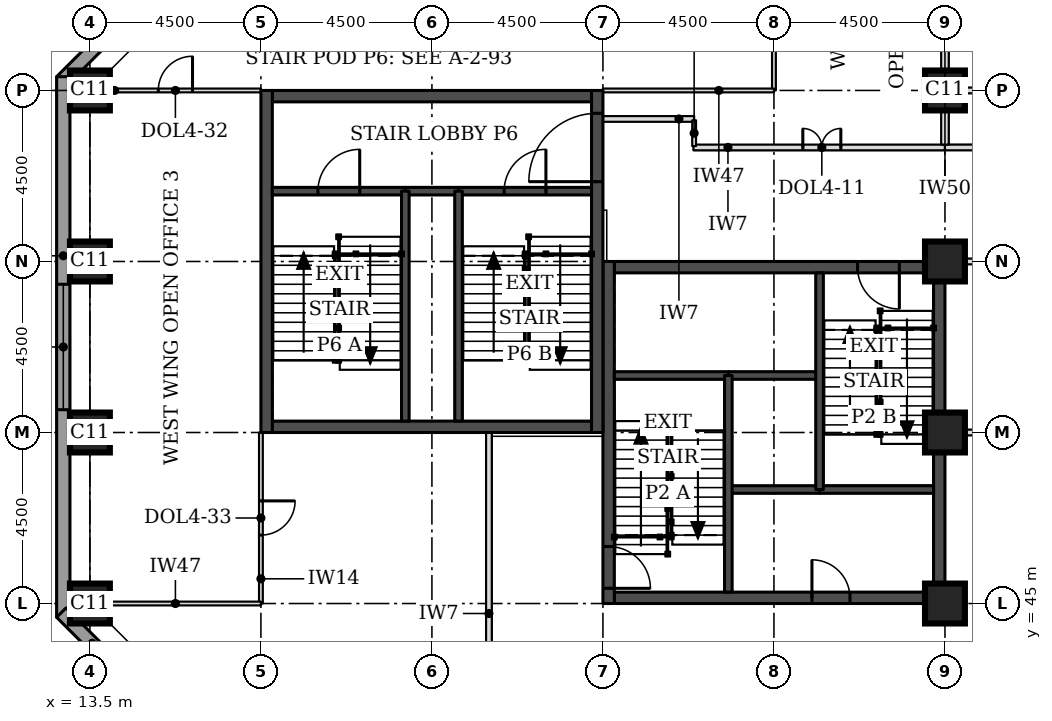
"""IFC4 building model, lengths in metres.
Left out: names, types, materials, properties, quantities, classifications, styles, units other than length and angle.
Written with IfcOpenShell. Run it as: python <this file> out.ifc"""

import sys

from ifc_helpers import new_model, si_unit, direction, frame, frame_2d, origin, origin_2d, place, context, subcontext, project, spatial, rectangle, extrude, element, fill, save


model = new_model("IFC4")
c1 = context("Model", 3, precision=1e-05, world=origin(), true_north=direction((0.0, 1.0)))
c2 = subcontext(c1, "Body", "Model", "MODEL_VIEW")
j1 = project(units=[si_unit("LENGTHUNIT", "METRE"), si_unit("PLANEANGLEUNIT", "RADIAN")], contexts=[c1])
p1 = place(None, origin())
s1 = spatial("IfcSite", under=j1, at=p1, CompositionType="ELEMENT")
p2 = place(p1, origin())
s2 = spatial("IfcBuilding", under=s1, at=p2, CompositionType="ELEMENT")
p3 = place(p2, frame((0.0, 0.0, 101.1)))
s3 = spatial("IfcBuildingStorey", under=s2, at=p3, CompositionType="ELEMENT", Elevation=101.1)
for number, where, z_axis, x_axis in (
    (1, (13.5, 45.0, 0.0), (0.0, 0.0, 1.0), (1.0, 0.0, 0.0)),
    (2, (36.0, 45.0, 0.0), (0.0, 0.0, 1.0), (1.0, 0.0, 0.0)),
    (3, (13.5, 49.5, 0.0), (0.0, 0.0, 1.0), (1.0, 0.0, 0.0)),
    (4, (36.0, 49.5, 0.0), (0.0, 0.0, 1.0), (1.0, 0.0, 0.0)),
    (5, (13.5, 54.0, 0.0), (0.0, 0.0, 1.0), (1.0, 0.0, 0.0)),
    (6, (36.0, 54.0, 0.0), (0.0, 0.0, 1.0), (1.0, 0.0, 0.0)),
    (7, (13.5, 58.5, 0.0), (0.0, 0.0, 1.0), (1.0, 0.0, 0.0)),
    (8, (36.0, 58.5, 0.0), (0.0, 0.0, 1.0), (1.0, 0.0, 0.0)),
):
    element("IfcColumn", number, at=place(p3, frame(where, z_axis=z_axis, x_axis=x_axis)), inside=s3, PredefinedType="COLUMN", context=c2, shape_type="SweptSolid", body=[
        extrude(rectangle(XDim=1.05, YDim=1.05, at=origin_2d()), origin(), (0.0, 0.0, 1.0), 3.7),
    ])
p4 = place(p3, frame((27.3, 45.15, 0.0), z_axis=(0.0, 0.0, 1.0), x_axis=(1.0, 0.0, 0.0)))
e9 = element("IfcWall", 9, at=p4, inside=s3, PredefinedType="SHEAR", context=c2, shape_type="SweptSolid", body=[
    extrude(rectangle(XDim=8.4, YDim=0.3, at=frame_2d((4.2, 0.0))), origin(), (0.0, 0.0, 1.0), 3.7),
])
p5 = place(p4, frame((5.2, 0.0, 0.0)))
e10 = element("IfcOpeningElement", 10, at=p5, cuts=e9, PredefinedType="OPENING", context=c2, shape_type="SweptSolid", body=[
    extrude(rectangle(XDim=1.0, YDim=2.1, at=frame_2d((0.5, 1.05))), frame((0.0, 0.16, 0.0), z_axis=(0.0, -1.0, 0.0), x_axis=(1.0, 0.0, 0.0)), (0.0, 0.0, 1.0), 0.32),
])
p6 = place(p3, frame((27.3, 53.85, 0.0), z_axis=(0.0, 0.0, 1.0), x_axis=(1.0, 0.0, 0.0)))
e11 = element("IfcWall", 11, at=p6, inside=s3, PredefinedType="SHEAR", context=c2, shape_type="SweptSolid", body=[
    extrude(rectangle(XDim=8.4, YDim=0.3, at=frame_2d((4.2, 0.0))), origin(), (0.0, 0.0, 1.0), 3.7),
])
p7 = place(p6, frame((6.4, 0.0, 0.0)))
e12 = element("IfcOpeningElement", 12, at=p7, cuts=e11, PredefinedType="OPENING", context=c2, shape_type="SweptSolid", body=[
    extrude(rectangle(XDim=1.1, YDim=2.1, at=frame_2d((0.55, 1.05))), frame((0.0, 0.16, 0.0), z_axis=(0.0, -1.0, 0.0), x_axis=(1.0, 0.0, 0.0)), (0.0, 0.0, 1.0), 0.32),
])
p8 = place(p3, frame((27.15, 45.0, 0.0), z_axis=(0.0, 0.0, 1.0), x_axis=(0.0, 1.0, 0.0)))
e13 = element("IfcWall", 13, at=p8, inside=s3, PredefinedType="SHEAR", context=c2, shape_type="SweptSolid", body=[
    extrude(rectangle(XDim=9.0, YDim=0.3, at=frame_2d((4.5, 0.0))), origin(), (0.0, 0.0, 1.0), 3.7),
])
p9 = place(p8, frame((0.4, 0.0, 0.0)))
e14 = element("IfcOpeningElement", 14, at=p9, cuts=e13, PredefinedType="OPENING", context=c2, shape_type="SweptSolid", body=[
    extrude(rectangle(XDim=1.1, YDim=2.1, at=frame_2d((0.55, 1.05))), frame((0.0, 0.16, 0.0), z_axis=(0.0, -1.0, 0.0), x_axis=(1.0, 0.0, 0.0)), (0.0, 0.0, 1.0), 0.32),
])
p10 = place(p3, frame((35.85, 45.0, 0.0), z_axis=(0.0, 0.0, 1.0), x_axis=(0.0, 1.0, 0.0)))
e15 = element("IfcWall", 15, at=p10, inside=s3, PredefinedType="SHEAR", context=c2, shape_type="SweptSolid", body=[
    extrude(rectangle(XDim=9.0, YDim=0.3, at=frame_2d((4.5, 0.0))), origin(), (0.0, 0.0, 1.0), 3.7),
])
for number, where, z_axis, x_axis in (
    (16, (18.3, 49.65, 0.0), (0.0, 0.0, 1.0), (1.0, 0.0, 0.0)),
    (17, (18.3, 58.35, 0.0), (0.0, 0.0, 1.0), (1.0, 0.0, 0.0)),
):
    element("IfcWall", number, at=place(p3, frame(where, z_axis=z_axis, x_axis=x_axis)), inside=s3, PredefinedType="SHEAR", context=c2, shape_type="SweptSolid", body=[
        extrude(rectangle(XDim=8.4, YDim=0.3, at=frame_2d((4.2, 0.0))), origin(), (0.0, 0.0, 1.0), 3.7),
    ])
p11 = place(p3, frame((18.15, 49.5, 0.0), z_axis=(0.0, 0.0, 1.0), x_axis=(0.0, 1.0, 0.0)))
e18 = element("IfcWall", 18, at=p11, inside=s3, PredefinedType="SHEAR", context=c2, shape_type="SweptSolid", body=[
    extrude(rectangle(XDim=9.0, YDim=0.3, at=frame_2d((4.5, 0.0))), origin(), (0.0, 0.0, 1.0), 3.7),
])
p12 = place(p3, frame((26.85, 49.5, 0.0), z_axis=(0.0, 0.0, 1.0), x_axis=(0.0, 1.0, 0.0)))
e19 = element("IfcWall", 19, at=p12, inside=s3, PredefinedType="SHEAR", context=c2, shape_type="SweptSolid", body=[
    extrude(rectangle(XDim=9.0, YDim=0.3, at=frame_2d((4.5, 0.0))), origin(), (0.0, 0.0, 1.0), 3.7),
])
p13 = place(p12, frame((6.6, 0.0, 0.0)))
e20 = element("IfcOpeningElement", 20, at=p13, cuts=e19, PredefinedType="OPENING", context=c2, shape_type="SweptSolid", body=[
    extrude(rectangle(XDim=1.8, YDim=2.1, at=frame_2d((0.9, 1.05))), frame((0.0, 0.16, 0.0), z_axis=(0.0, -1.0, 0.0), x_axis=(1.0, 0.0, 0.0)), (0.0, 0.0, 1.0), 0.32),
])
p14 = place(p3, frame((17.761, 63.751, 0.0), z_axis=(0.0, 0.0, 1.0), x_axis=(-0.707106781187, -0.707106781187, 0.0)))
e21 = element("IfcWall", 21, at=p14, inside=s3, PredefinedType="STANDARD", context=c2, shape_type="SweptSolid", body=[
    extrude(rectangle(XDim=7.089, YDim=0.35, at=frame_2d((3.544, 0.0))), origin(), (0.0, 0.0, 1.0), 3.525),
])
p15 = place(p14, frame((1.894, 0.0, 0.9)))
e22 = element("IfcOpeningElement", 22, at=p15, cuts=e21, PredefinedType="OPENING", context=c2, shape_type="SweptSolid", body=[
    extrude(rectangle(XDim=3.3, YDim=1.9, at=frame_2d((1.65, 0.95))), frame((0.0, 0.185, 0.0), z_axis=(0.0, -1.0, 0.0), x_axis=(1.0, 0.0, 0.0)), (0.0, 0.0, 1.0), 0.37),
])
p16 = place(p3, frame((12.8, 58.862, 0.0), z_axis=(0.0, 0.0, 1.0), x_axis=(0.0, -1.0, 0.0)))
e23 = element("IfcWall", 23, at=p16, inside=s3, PredefinedType="STANDARD", context=c2, shape_type="SweptSolid", body=[
    extrude(rectangle(XDim=14.225, YDim=0.35, at=frame_2d((7.112, 0.0))), origin(), (0.0, 0.0, 1.0), 3.525),
])
p17 = place(p16, frame((5.462, 0.0, 0.9)))
e24 = element("IfcOpeningElement", 24, at=p17, cuts=e23, PredefinedType="OPENING", context=c2, shape_type="SweptSolid", body=[
    extrude(rectangle(XDim=3.3, YDim=1.9, at=frame_2d((1.65, 0.95))), frame((0.0, 0.185, 0.0), z_axis=(0.0, -1.0, 0.0), x_axis=(1.0, 0.0, 0.0)), (0.0, 0.0, 1.0), 0.37),
])
p18 = place(p3, frame((12.749, 44.761, 0.0), z_axis=(0.0, 0.0, 1.0), x_axis=(0.707106781187, -0.707106781187, 0.0)))
e25 = element("IfcWall", 25, at=p18, inside=s3, PredefinedType="STANDARD", context=c2, shape_type="SweptSolid", body=[
    extrude(rectangle(XDim=7.089, YDim=0.35, at=frame_2d((3.544, 0.0))), origin(), (0.0, 0.0, 1.0), 3.525),
])
p19 = place(p18, frame((1.894, 0.0, 0.9)))
e26 = element("IfcOpeningElement", 26, at=p19, cuts=e25, PredefinedType="OPENING", context=c2, shape_type="SweptSolid", body=[
    extrude(rectangle(XDim=3.3, YDim=1.9, at=frame_2d((1.65, 0.95))), frame((0.0, 0.185, 0.0), z_axis=(0.0, -1.0, 0.0), x_axis=(1.0, 0.0, 0.0)), (0.0, 0.0, 1.0), 0.37),
])
for number, where, z_axis, x_axis in (
    (27, (36.525, 49.5, 0.0), (0.0, 0.0, 1.0), (1.0, 0.0, 0.0)),
    (28, (36.525, 54.0, 0.0), (0.0, 0.0, 1.0), (1.0, 0.0, 0.0)),
):
    element("IfcWall", number, at=place(p3, frame(where, z_axis=z_axis, x_axis=x_axis)), inside=s3, PredefinedType="PARTITIONING", context=c2, shape_type="SweptSolid", body=[
        extrude(rectangle(XDim=5.55, YDim=0.15, at=frame_2d((2.775, 0.0))), origin(), (0.0, 0.0, 1.0), 3.55),
    ])
p20 = place(p3, frame((29.38, 57.0, 0.0), z_axis=(0.0, 0.0, 1.0), x_axis=(1.0, 0.0, 0.0)))
e29 = element("IfcWall", 29, at=p20, inside=s3, PredefinedType="PARTITIONING", context=c2, shape_type="SweptSolid", body=[
    extrude(rectangle(XDim=6.62, YDim=0.15, at=frame_2d((3.31, 0.0))), origin(), (0.0, 0.0, 1.0), 3.55),
])
p21 = place(p20, frame((2.88, 0.0, 0.0)))
e30 = element("IfcOpeningElement", 30, at=p21, cuts=e29, PredefinedType="OPENING", context=c2, shape_type="SweptSolid", body=[
    extrude(rectangle(XDim=1.0, YDim=2.1, at=frame_2d((0.5, 1.05))), frame((0.0, 0.085, 0.0), z_axis=(0.0, -1.0, 0.0), x_axis=(1.0, 0.0, 0.0)), (0.0, 0.0, 1.0), 0.17),
])
p22 = place(p3, frame((36.0, 57.0, 0.0), z_axis=(0.0, 0.0, 1.0), x_axis=(1.0, 0.0, 0.0)))
e31 = element("IfcWall", 31, at=p22, inside=s3, PredefinedType="PARTITIONING", context=c2, shape_type="SweptSolid", body=[
    extrude(rectangle(XDim=6.075, YDim=0.15, at=frame_2d((3.038, 0.0))), origin(), (0.0, 0.0, 1.0), 3.55),
])
p23 = place(p3, frame((36.525, 58.5, 0.0), z_axis=(0.0, 0.0, 1.0), x_axis=(1.0, 0.0, 0.0)))
e32 = element("IfcWall", 32, at=p23, inside=s3, PredefinedType="PARTITIONING", context=c2, shape_type="SweptSolid", body=[
    extrude(rectangle(XDim=2.55, YDim=0.15, at=frame_2d((1.275, 0.0))), origin(), (0.0, 0.0, 1.0), 3.55),
])
p24 = place(p3, frame((24.0, 39.975, 0.0), z_axis=(0.0, 0.0, 1.0), x_axis=(0.0, 1.0, 0.0)))
e33 = element("IfcWall", 33, at=p24, inside=s3, PredefinedType="PARTITIONING", context=c2, shape_type="SweptSolid", body=[
    extrude(rectangle(XDim=9.525, YDim=0.15, at=frame_2d((4.762, 0.0))), origin(), (0.0, 0.0, 1.0), 3.55),
])
p25 = place(p3, frame((36.0, 57.075, 0.0), z_axis=(0.0, 0.0, 1.0), x_axis=(0.0, 1.0, 0.0)))
e34 = element("IfcWall", 34, at=p25, inside=s3, PredefinedType="PARTITIONING", context=c2, shape_type="SweptSolid", body=[
    extrude(rectangle(XDim=0.9, YDim=0.2, at=frame_2d((0.45, 0.0))), origin(), (0.0, 0.0, 1.0), 2.8),
])
p26 = place(p3, frame((36.0, 58.995, 0.0), z_axis=(0.0, 0.0, 1.0), x_axis=(0.0, 1.0, 0.0)))
e35 = element("IfcWall", 35, at=p26, inside=s3, PredefinedType="PARTITIONING", context=c2, shape_type="SweptSolid", body=[
    extrude(rectangle(XDim=1.005, YDim=0.2, at=frame_2d((0.502, 0.0))), origin(), (0.0, 0.0, 1.0), 2.8),
])
p27 = place(p3, frame((31.5, 63.0, 0.0), z_axis=(0.0, 0.0, 1.0), x_axis=(0.0, -1.0, 0.0)))
e36 = element("IfcWall", 36, at=p27, inside=s3, PredefinedType="PARTITIONING", context=c2, shape_type="SweptSolid", body=[
    extrude(rectangle(XDim=4.5, YDim=0.1, at=frame_2d((2.25, 0.0))), origin(), (0.0, 0.0, 1.0), 3.55),
])
p28 = place(p27, frame((1.8, 0.0, 0.0)))
e37 = element("IfcOpeningElement", 37, at=p28, cuts=e36, PredefinedType="OPENING", context=c2, shape_type="SweptSolid", body=[
    extrude(rectangle(XDim=0.9, YDim=2.1, at=frame_2d((0.45, 1.05))), frame((0.0, 0.06, 0.0), z_axis=(0.0, -1.0, 0.0), x_axis=(1.0, 0.0, 0.0)), (0.0, 0.0, 1.0), 0.12),
])
p29 = place(p3, frame((31.5, 58.5, 0.0), z_axis=(0.0, 0.0, 1.0), x_axis=(-1.0, 0.0, 0.0)))
e38 = element("IfcWall", 38, at=p29, inside=s3, PredefinedType="PARTITIONING", context=c2, shape_type="SweptSolid", body=[
    extrude(rectangle(XDim=4.5, YDim=0.1, at=frame_2d((2.25, 0.0))), origin(), (0.0, 0.0, 1.0), 2.55),
])
p30 = place(p3, frame((13.5, 58.5, 0.0), z_axis=(0.0, 0.0, 1.0), x_axis=(1.0, 0.0, 0.0)))
e39 = element("IfcWall", 39, at=p30, inside=s3, PredefinedType="PARTITIONING", context=c2, shape_type="SweptSolid", body=[
    extrude(rectangle(XDim=4.5, YDim=0.1, at=frame_2d((2.25, 0.0))), origin(), (0.0, 0.0, 1.0), 2.55),
])
p31 = place(p30, frame((1.8, 0.0, 0.0)))
e40 = element("IfcOpeningElement", 40, at=p31, cuts=e39, PredefinedType="OPENING", context=c2, shape_type="SweptSolid", body=[
    extrude(rectangle(XDim=0.9, YDim=2.1, at=frame_2d((0.45, 1.05))), frame((0.0, 0.06, 0.0), z_axis=(0.0, -1.0, 0.0), x_axis=(1.0, 0.0, 0.0)), (0.0, 0.0, 1.0), 0.12),
])
p32 = place(p3, frame((18.0, 49.5, 0.0), z_axis=(0.0, 0.0, 1.0), x_axis=(0.0, -1.0, 0.0)))
e41 = element("IfcWall", 41, at=p32, inside=s3, PredefinedType="PARTITIONING", context=c2, shape_type="SweptSolid", body=[
    extrude(rectangle(XDim=4.5, YDim=0.1, at=frame_2d((2.25, 0.0))), origin(), (0.0, 0.0, 1.0), 3.55),
])
p33 = place(p32, frame((1.8, 0.0, 0.0)))
e42 = element("IfcOpeningElement", 42, at=p33, cuts=e41, PredefinedType="OPENING", context=c2, shape_type="SweptSolid", body=[
    extrude(rectangle(XDim=0.9, YDim=2.1, at=frame_2d((0.45, 1.05))), frame((0.0, 0.06, 0.0), z_axis=(0.0, -1.0, 0.0), x_axis=(1.0, 0.0, 0.0)), (0.0, 0.0, 1.0), 0.12),
])
p34 = place(p3, frame((18.0, 45.0, 0.0), z_axis=(0.0, 0.0, 1.0), x_axis=(-1.0, 0.0, 0.0)))
e43 = element("IfcWall", 43, at=p34, inside=s3, PredefinedType="PARTITIONING", context=c2, shape_type="SweptSolid", body=[
    extrude(rectangle(XDim=4.5, YDim=0.1, at=frame_2d((2.25, 0.0))), origin(), (0.0, 0.0, 1.0), 2.55),
])
p35 = place(p3, frame((27.0, 57.75, 0.0), z_axis=(0.0, 0.0, 1.0), x_axis=(1.0, 0.0, 0.0)))
e44 = element("IfcWall", 44, at=p35, inside=s3, PredefinedType="PARTITIONING", context=c2, shape_type="SweptSolid", body=[
    extrude(rectangle(XDim=2.4, YDim=0.15, at=frame_2d((1.2, 0.0))), origin(), (0.0, 0.0, 1.0), 3.55),
])
p36 = place(p3, frame((29.4, 57.715, 0.0), z_axis=(0.0, 0.0, 1.0), x_axis=(0.0, -1.0, 0.0)))
e45 = element("IfcWall", 45, at=p36, inside=s3, PredefinedType="PARTITIONING", context=c2, shape_type="SweptSolid", body=[
    extrude(rectangle(XDim=0.68, YDim=0.1, at=frame_2d((0.34, 0.0))), origin(), (0.0, 0.0, 1.0), 3.55),
])
p37 = place(p3, frame((30.3, 48.0, 0.0), z_axis=(0.0, 0.0, 1.0), x_axis=(1.0, 0.0, 0.0)))
e46 = element("IfcWall", 46, at=p37, inside=s3, PredefinedType="SOLIDWALL", context=c2, shape_type="SweptSolid", body=[
    extrude(rectangle(XDim=2.4, YDim=0.2, at=frame_2d((1.2, 0.0))), origin(), (0.0, 0.0, 1.0), 3.55),
])
p38 = place(p3, frame((32.7, 48.0, 0.0), z_axis=(0.0, 0.0, 1.0), x_axis=(1.0, 0.0, 0.0)))
e47 = element("IfcWall", 47, at=p38, inside=s3, PredefinedType="SOLIDWALL", context=c2, shape_type="SweptSolid", body=[
    extrude(rectangle(XDim=3.0, YDim=0.2, at=frame_2d((1.5, 0.0))), origin(), (0.0, 0.0, 1.0), 3.55),
])
p39 = place(p3, frame((30.3, 51.0, 0.0), z_axis=(0.0, 0.0, 1.0), x_axis=(1.0, 0.0, 0.0)))
e48 = element("IfcWall", 48, at=p39, inside=s3, PredefinedType="SOLIDWALL", context=c2, shape_type="SweptSolid", body=[
    extrude(rectangle(XDim=2.4, YDim=0.2, at=frame_2d((1.2, 0.0))), origin(), (0.0, 0.0, 1.0), 3.7),
])
p40 = place(p3, frame((27.3, 51.0, 0.0), z_axis=(0.0, 0.0, 1.0), x_axis=(1.0, 0.0, 0.0)))
e49 = element("IfcWall", 49, at=p40, inside=s3, PredefinedType="SOLIDWALL", context=c2, shape_type="SweptSolid", body=[
    extrude(rectangle(XDim=3.0, YDim=0.2, at=frame_2d((1.5, 0.0))), origin(), (0.0, 0.0, 1.0), 3.55),
])
for number, where, z_axis, x_axis in (
    (50, (30.3, 45.3, 0.0), (0.0, 0.0, 1.0), (0.0, 1.0, 0.0)),
    (51, (32.7, 48.0, 0.0), (0.0, 0.0, 1.0), (0.0, 1.0, 0.0)),
):
    element("IfcWall", number, at=place(p3, frame(where, z_axis=z_axis, x_axis=x_axis)), inside=s3, PredefinedType="SOLIDWALL", context=c2, shape_type="SweptSolid", body=[
        extrude(rectangle(XDim=5.7, YDim=0.2, at=frame_2d((2.85, 0.0))), origin(), (0.0, 0.0, 1.0), 3.55),
    ])
p41 = place(p3, frame((21.8, 55.85, 0.0), z_axis=(0.0, 0.0, 1.0), x_axis=(1.0, 0.0, 0.0)))
e52 = element("IfcWall", 52, at=p41, inside=s3, PredefinedType="SOLIDWALL", context=c2, shape_type="SweptSolid", body=[
    extrude(rectangle(XDim=1.4, YDim=0.2, at=frame_2d((0.7, 0.0))), origin(), (0.0, 0.0, 1.0), 3.55),
])
p42 = place(p3, frame((18.3, 55.85, 0.0), z_axis=(0.0, 0.0, 1.0), x_axis=(1.0, 0.0, 0.0)))
e53 = element("IfcWall", 53, at=p42, inside=s3, PredefinedType="SOLIDWALL", context=c2, shape_type="SweptSolid", body=[
    extrude(rectangle(XDim=3.5, YDim=0.2, at=frame_2d((1.75, 0.0))), origin(), (0.0, 0.0, 1.0), 3.55),
])
p43 = place(p42, frame((1.2, 0.0, 0.0)))
e54 = element("IfcOpeningElement", 54, at=p43, cuts=e53, PredefinedType="OPENING", context=c2, shape_type="SweptSolid", body=[
    extrude(rectangle(XDim=1.1, YDim=2.1, at=frame_2d((0.55, 1.05))), frame((0.0, 0.11, 0.0), z_axis=(0.0, -1.0, 0.0), x_axis=(1.0, 0.0, 0.0)), (0.0, 0.0, 1.0), 0.22),
])
p44 = place(p3, frame((23.2, 55.85, 0.0), z_axis=(0.0, 0.0, 1.0), x_axis=(1.0, 0.0, 0.0)))
e55 = element("IfcWall", 55, at=p44, inside=s3, PredefinedType="SOLIDWALL", context=c2, shape_type="SweptSolid", body=[
    extrude(rectangle(XDim=3.5, YDim=0.2, at=frame_2d((1.75, 0.0))), origin(), (0.0, 0.0, 1.0), 3.55),
])
p45 = place(p44, frame((1.2, 0.0, 0.0)))
e56 = element("IfcOpeningElement", 56, at=p45, cuts=e55, PredefinedType="OPENING", context=c2, shape_type="SweptSolid", body=[
    extrude(rectangle(XDim=1.1, YDim=2.1, at=frame_2d((0.55, 1.05))), frame((0.0, 0.11, 0.0), z_axis=(0.0, -1.0, 0.0), x_axis=(1.0, 0.0, 0.0)), (0.0, 0.0, 1.0), 0.22),
])
for number, where, z_axis, x_axis in (
    (57, (21.8, 49.8, 0.0), (0.0, 0.0, 1.0), (0.0, 1.0, 0.0)),
    (58, (23.2, 49.8, 0.0), (0.0, 0.0, 1.0), (0.0, 1.0, 0.0)),
):
    element("IfcWall", number, at=place(p3, frame(where, z_axis=z_axis, x_axis=x_axis)), inside=s3, PredefinedType="SOLIDWALL", context=c2, shape_type="SweptSolid", body=[
        extrude(rectangle(XDim=6.05, YDim=0.2, at=frame_2d((3.025, 0.0))), origin(), (0.0, 0.0, 1.0), 3.55),
    ])
p46 = place(p17, origin())
e59 = element("IfcWindow", 59, at=p46, inside=s3, PartitioningType="SINGLE_PANEL", PredefinedType="WINDOW", context=c2, shape_type="SweptSolid", body=[
    extrude(rectangle(XDim=3.3, YDim=1.9, at=frame_2d((1.65, 0.95))), frame((0.0, 0.085, 0.0), z_axis=(0.0, -1.0, 0.0), x_axis=(1.0, 0.0, 0.0)), (0.0, 0.0, 1.0), 0.06),
])
fill(e24, e59)
p47 = place(p21, origin())
e60 = element("IfcDoor", 60, at=p47, inside=s3, OperationType="DOUBLE_DOOR_SINGLE_SWING", PredefinedType="DOOR", context=c2, shape_type="SweptSolid", body=[
    extrude(rectangle(XDim=1.0, YDim=2.1, at=frame_2d((0.5, 1.05))), frame((0.0, 0.025, 0.0), z_axis=(0.0, -1.0, 0.0), x_axis=(1.0, 0.0, 0.0)), (0.0, 0.0, 1.0), 0.05),
])
fill(e30, e60)
p48 = place(p31, origin())
e61 = element("IfcDoor", 61, at=p48, inside=s3, OperationType="SINGLE_SWING_RIGHT", PredefinedType="DOOR", context=c2, shape_type="SweptSolid", body=[
    extrude(rectangle(XDim=0.9, YDim=2.1, at=frame_2d((0.45, 1.05))), frame((0.0, 0.025, 0.0), z_axis=(0.0, -1.0, 0.0), x_axis=(1.0, 0.0, 0.0)), (0.0, 0.0, 1.0), 0.05),
])
fill(e40, e61)
p49 = place(p33, origin())
e62 = element("IfcDoor", 62, at=p49, inside=s3, OperationType="SINGLE_SWING_LEFT", PredefinedType="DOOR", context=c2, shape_type="SweptSolid", body=[
    extrude(rectangle(XDim=0.9, YDim=2.1, at=frame_2d((0.45, 1.05))), frame((0.0, 0.025, 0.0), z_axis=(0.0, -1.0, 0.0), x_axis=(1.0, 0.0, 0.0)), (0.0, 0.0, 1.0), 0.05),
])
fill(e42, e62)
p50 = place(p9, frame((1.1, 0.0, 0.0), z_axis=(0.0, 0.0, 1.0), x_axis=(-1.0, 0.0, 0.0)))
e63 = element("IfcDoor", 63, at=p50, inside=s3, OperationType="SINGLE_SWING_RIGHT", PredefinedType="DOOR", context=c2, shape_type="SweptSolid", body=[
    extrude(rectangle(XDim=1.1, YDim=2.1, at=frame_2d((0.55, 1.05))), frame((0.0, 0.025, 0.0), z_axis=(0.0, -1.0, 0.0), x_axis=(1.0, 0.0, 0.0)), (0.0, 0.0, 1.0), 0.05),
])
fill(e14, e63)
p51 = place(p7, frame((1.1, 0.0, 0.0), z_axis=(0.0, 0.0, 1.0), x_axis=(-1.0, 0.0, 0.0)))
e64 = element("IfcDoor", 64, at=p51, inside=s3, OperationType="SINGLE_SWING_LEFT", PredefinedType="DOOR", context=c2, shape_type="SweptSolid", body=[
    extrude(rectangle(XDim=1.1, YDim=2.1, at=frame_2d((0.55, 1.05))), frame((0.0, 0.025, 0.0), z_axis=(0.0, -1.0, 0.0), x_axis=(1.0, 0.0, 0.0)), (0.0, 0.0, 1.0), 0.05),
])
fill(e12, e64)
p52 = place(p5, origin())
e65 = element("IfcDoor", 65, at=p52, inside=s3, OperationType="SINGLE_SWING_LEFT", PredefinedType="DOOR", context=c2, shape_type="SweptSolid", body=[
    extrude(rectangle(XDim=1.0, YDim=2.1, at=frame_2d((0.5, 1.05))), frame((0.0, 0.025, 0.0), z_axis=(0.0, -1.0, 0.0), x_axis=(1.0, 0.0, 0.0)), (0.0, 0.0, 1.0), 0.05),
])
fill(e10, e65)
p53 = place(p43, origin())
e66 = element("IfcDoor", 66, at=p53, inside=s3, OperationType="SINGLE_SWING_RIGHT", PredefinedType="DOOR", context=c2, shape_type="SweptSolid", body=[
    extrude(rectangle(XDim=1.1, YDim=2.1, at=frame_2d((0.55, 1.05))), frame((0.0, 0.025, 0.0), z_axis=(0.0, -1.0, 0.0), x_axis=(1.0, 0.0, 0.0)), (0.0, 0.0, 1.0), 0.05),
])
fill(e54, e66)
p54 = place(p45, origin())
e67 = element("IfcDoor", 67, at=p54, inside=s3, OperationType="SINGLE_SWING_RIGHT", PredefinedType="DOOR", context=c2, shape_type="SweptSolid", body=[
    extrude(rectangle(XDim=1.1, YDim=2.1, at=frame_2d((0.55, 1.05))), frame((0.0, 0.025, 0.0), z_axis=(0.0, -1.0, 0.0), x_axis=(1.0, 0.0, 0.0)), (0.0, 0.0, 1.0), 0.05),
])
fill(e56, e67)
p55 = place(p13, origin())
e68 = element("IfcDoor", 68, at=p55, inside=s3, OperationType="SINGLE_SWING_LEFT", PredefinedType="DOOR", context=c2, shape_type="SweptSolid", body=[
    extrude(rectangle(XDim=1.8, YDim=2.1, at=frame_2d((0.9, 1.05))), frame((0.0, 0.025, 0.0), z_axis=(0.0, -1.0, 0.0), x_axis=(1.0, 0.0, 0.0)), (0.0, 0.0, 1.0), 0.05),
])
fill(e20, e68)
save(model, sys.argv[1])
